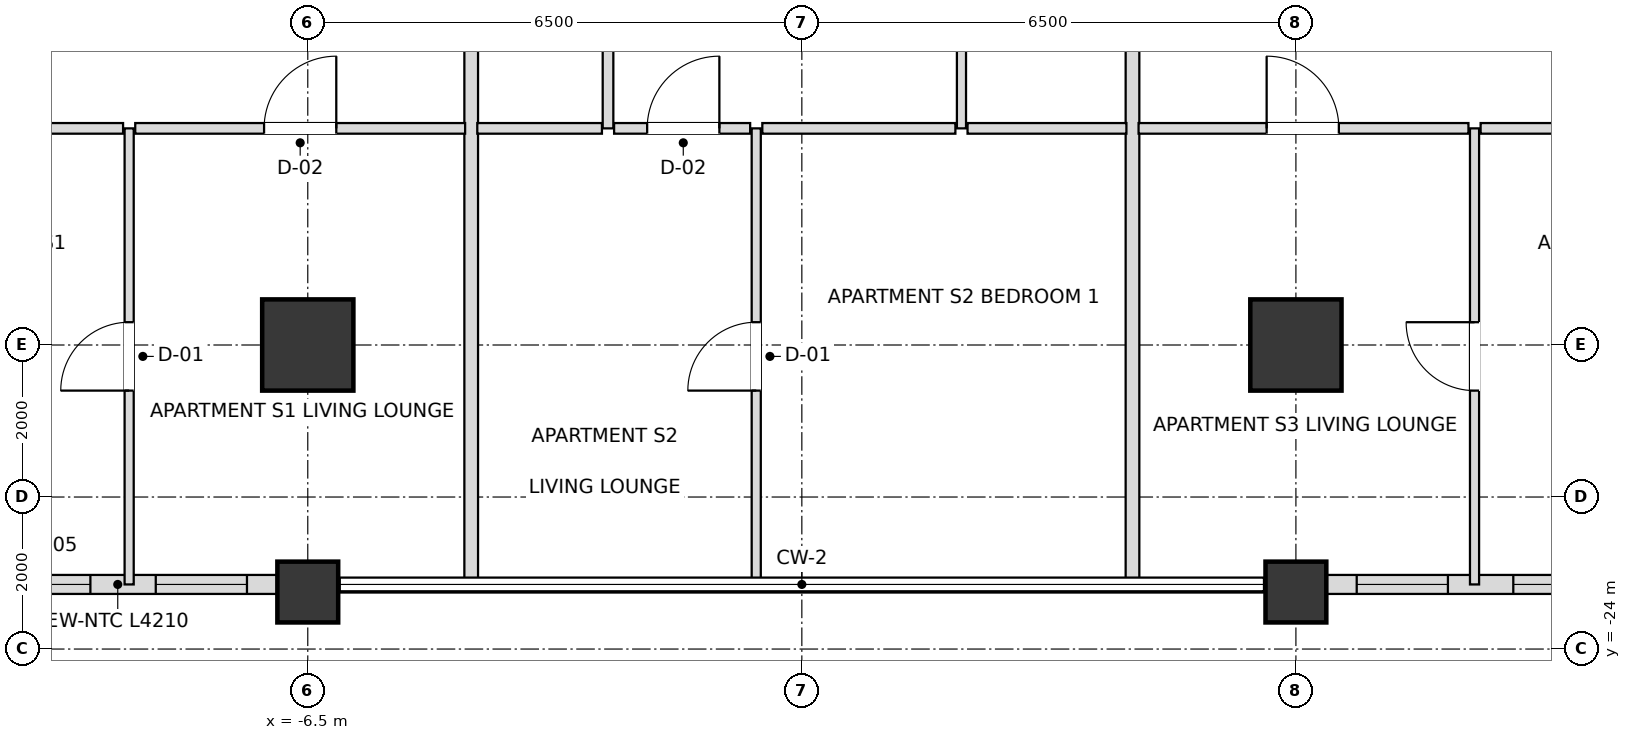
"""IFC4 building model, lengths in metres.
Left out: names, types, materials, properties, quantities, classifications, styles, units other than length and angle.
Written with IfcOpenShell. Run it as: python <this file> out.ifc"""

import sys

from ifc_helpers import new_model, si_unit, direction, frame, frame_2d, origin, origin_2d, place, context, subcontext, project, spatial, rectangle, extrude, element, fill, save


model = new_model("IFC4")
c1 = context("Model", 3, precision=1e-05, world=origin(), true_north=direction((0.0, 1.0)))
c2 = subcontext(c1, "Body", "Model", "MODEL_VIEW")
j1 = project(units=[si_unit("LENGTHUNIT", "METRE"), si_unit("PLANEANGLEUNIT", "RADIAN")], contexts=[c1])
p1 = place(None, origin())
s1 = spatial("IfcSite", under=j1, at=p1, CompositionType="ELEMENT")
p2 = place(p1, origin())
s2 = spatial("IfcBuilding", under=s1, at=p2, CompositionType="ELEMENT")
p3 = place(p2, frame((0.0, 0.0, 117.0)))
s3 = spatial("IfcBuildingStorey", under=s2, at=p3, CompositionType="ELEMENT", Elevation=117.0)
for number, where, z_axis, x_axis in (
    (1, (-6.5, -20.0, 0.0), (0.0, 0.0, 1.0), (1.0, 0.0, 0.0)),
    (2, (6.5, -20.0, 0.0), (0.0, 0.0, 1.0), (1.0, 0.0, 0.0)),
):
    element("IfcColumn", number, at=place(p3, frame(where, z_axis=z_axis, x_axis=x_axis)), inside=s3, PredefinedType="USERDEFINED", context=c2, shape_type="SweptSolid", body=[
        extrude(rectangle(XDim=1.2, YDim=1.2, at=origin_2d()), origin(), (0.0, 0.0, 1.0), 3.6),
    ])
for number, where, z_axis, x_axis in (
    (3, (-6.5, -23.25, 0.0), (0.0, 0.0, 1.0), (1.0, 0.0, 0.0)),
    (4, (6.5, -23.25, 0.0), (0.0, 0.0, 1.0), (1.0, 0.0, 0.0)),
):
    element("IfcColumn", number, at=place(p3, frame(where, z_axis=z_axis, x_axis=x_axis)), inside=s3, PredefinedType="COLUMN", context=c2, shape_type="SweptSolid", body=[
        extrude(rectangle(XDim=0.8, YDim=0.8, at=origin_2d()), origin(), (0.0, 0.0, 1.0), 3.6),
    ])
p4 = place(p3, frame((-11.105, -23.15, 0.0), z_axis=(0.0, 0.0, 1.0), x_axis=(1.0, 0.0, 0.0)))
e5 = element("IfcWall", 5, at=p4, inside=s3, PredefinedType="SOLIDWALL", context=c2, shape_type="SweptSolid", body=[
    extrude(rectangle(XDim=4.21, YDim=0.25, at=frame_2d((2.105, 0.0))), origin(), (0.0, 0.0, 1.0), 2.656),
])
p5 = place(p4, frame((0.545, 0.0, 0.72)))
e6 = element("IfcOpeningElement", 6, at=p5, cuts=e5, PredefinedType="OPENING", context=c2, shape_type="SweptSolid", body=[
    extrude(rectangle(XDim=1.2, YDim=1.68, at=frame_2d((0.6, 0.84))), frame((0.0, 0.135, 0.0), z_axis=(0.0, -1.0, 0.0), x_axis=(1.0, 0.0, 0.0)), (0.0, 0.0, 1.0), 0.27),
])
p6 = place(p4, frame((2.605, 0.0, 0.72)))
e7 = element("IfcOpeningElement", 7, at=p6, cuts=e5, PredefinedType="OPENING", context=c2, shape_type="SweptSolid", body=[
    extrude(rectangle(XDim=1.2, YDim=1.68, at=frame_2d((0.6, 0.84))), frame((0.0, 0.135, 0.0), z_axis=(0.0, -1.0, 0.0), x_axis=(1.0, 0.0, 0.0)), (0.0, 0.0, 1.0), 0.27),
])
p7 = place(p3, frame((6.895, -23.15, 0.0), z_axis=(0.0, 0.0, 1.0), x_axis=(1.0, 0.0, 0.0)))
e8 = element("IfcWall", 8, at=p7, inside=s3, PredefinedType="SOLIDWALL", context=c2, shape_type="SweptSolid", body=[
    extrude(rectangle(XDim=4.21, YDim=0.25, at=frame_2d((2.105, 0.0))), origin(), (0.0, 0.0, 1.0), 2.656),
])
p8 = place(p7, frame((0.405, 0.0, 0.72)))
e9 = element("IfcOpeningElement", 9, at=p8, cuts=e8, PredefinedType="OPENING", context=c2, shape_type="SweptSolid", body=[
    extrude(rectangle(XDim=1.2, YDim=1.68, at=frame_2d((0.6, 0.84))), frame((0.0, 0.135, 0.0), z_axis=(0.0, -1.0, 0.0), x_axis=(1.0, 0.0, 0.0)), (0.0, 0.0, 1.0), 0.27),
])
p9 = place(p7, frame((2.465, 0.0, 0.72)))
e10 = element("IfcOpeningElement", 10, at=p9, cuts=e8, PredefinedType="OPENING", context=c2, shape_type="SweptSolid", body=[
    extrude(rectangle(XDim=1.2, YDim=1.68, at=frame_2d((0.6, 0.84))), frame((0.0, 0.135, 0.0), z_axis=(0.0, -1.0, 0.0), x_axis=(1.0, 0.0, 0.0)), (0.0, 0.0, 1.0), 0.27),
])
p10 = place(p3, frame((-8.85, -23.15, 0.0), z_axis=(0.0, 0.0, 1.0), x_axis=(0.0, 1.0, 0.0)))
e11 = element("IfcWall", 11, at=p10, inside=s3, PredefinedType="PARTITIONING", context=c2, shape_type="SweptSolid", body=[
    extrude(rectangle(XDim=6.0, YDim=0.12, at=frame_2d((3.0, 0.0))), origin(), (0.0, 0.0, 1.0), 2.736),
])
p11 = place(p10, frame((2.55, 0.0, 0.0)))
e12 = element("IfcOpeningElement", 12, at=p11, cuts=e11, PredefinedType="OPENING", context=c2, shape_type="SweptSolid", body=[
    extrude(rectangle(XDim=0.9, YDim=2.1, at=frame_2d((0.45, 1.05))), frame((0.0, 0.07, 0.0), z_axis=(0.0, -1.0, 0.0), x_axis=(1.0, 0.0, 0.0)), (0.0, 0.0, 1.0), 0.14),
])
p12 = place(p3, frame((-4.35, -23.15, 0.0), z_axis=(0.0, 0.0, 1.0), x_axis=(0.0, 1.0, 0.0)))
e13 = element("IfcWall", 13, at=p12, inside=s3, PredefinedType="PARTITIONING", context=c2, shape_type="SweptSolid", body=[
    extrude(rectangle(XDim=13.85, YDim=0.18, at=frame_2d((6.925, 0.0))), origin(), (0.0, 0.0, 1.0), 2.736),
])
p13 = place(p3, frame((-2.55, -17.15, 0.0), z_axis=(0.0, 0.0, 1.0), x_axis=(0.0, 1.0, 0.0)))
e14 = element("IfcWall", 14, at=p13, inside=s3, PredefinedType="PARTITIONING", context=c2, shape_type="SweptSolid", body=[
    extrude(rectangle(XDim=7.85, YDim=0.14, at=frame_2d((3.925, 0.0))), origin(), (0.0, 0.0, 1.0), 3.3),
])
p14 = place(p13, frame((3.48, 0.0, 0.0)))
e15 = element("IfcOpeningElement", 15, at=p14, cuts=e14, PredefinedType="OPENING", context=c2, shape_type="SweptSolid", body=[
    extrude(rectangle(XDim=0.9, YDim=2.1, at=frame_2d((0.45, 1.05))), frame((0.0, 0.08, 0.0), z_axis=(0.0, -1.0, 0.0), x_axis=(1.0, 0.0, 0.0)), (0.0, 0.0, 1.0), 0.16),
])
p15 = place(p3, frame((-0.6, -23.15, 0.0), z_axis=(0.0, 0.0, 1.0), x_axis=(0.0, 1.0, 0.0)))
e16 = element("IfcWall", 16, at=p15, inside=s3, PredefinedType="PARTITIONING", context=c2, shape_type="SweptSolid", body=[
    extrude(rectangle(XDim=6.0, YDim=0.12, at=frame_2d((3.0, 0.0))), origin(), (0.0, 0.0, 1.0), 2.736),
])
p16 = place(p15, frame((2.55, 0.0, 0.0)))
e17 = element("IfcOpeningElement", 17, at=p16, cuts=e16, PredefinedType="OPENING", context=c2, shape_type="SweptSolid", body=[
    extrude(rectangle(XDim=0.9, YDim=2.1, at=frame_2d((0.45, 1.05))), frame((0.0, 0.07, 0.0), z_axis=(0.0, -1.0, 0.0), x_axis=(1.0, 0.0, 0.0)), (0.0, 0.0, 1.0), 0.14),
])
p17 = place(p3, frame((2.1, -17.15, 0.0), z_axis=(0.0, 0.0, 1.0), x_axis=(0.0, 1.0, 0.0)))
e18 = element("IfcWall", 18, at=p17, inside=s3, PredefinedType="PARTITIONING", context=c2, shape_type="SweptSolid", body=[
    extrude(rectangle(XDim=7.85, YDim=0.12, at=frame_2d((3.925, 0.0))), origin(), (0.0, 0.0, 1.0), 3.3),
])
p18 = place(p17, frame((3.455, 0.0, 0.0)))
e19 = element("IfcOpeningElement", 19, at=p18, cuts=e18, PredefinedType="OPENING", context=c2, shape_type="SweptSolid", body=[
    extrude(rectangle(XDim=0.95, YDim=2.1, at=frame_2d((0.475, 1.05))), frame((0.0, 0.07, 0.0), z_axis=(0.0, -1.0, 0.0), x_axis=(1.0, 0.0, 0.0)), (0.0, 0.0, 1.0), 0.14),
])
p19 = place(p3, frame((4.35, -23.15, 0.0), z_axis=(0.0, 0.0, 1.0), x_axis=(0.0, 1.0, 0.0)))
e20 = element("IfcWall", 20, at=p19, inside=s3, PredefinedType="PARTITIONING", context=c2, shape_type="SweptSolid", body=[
    extrude(rectangle(XDim=13.85, YDim=0.18, at=frame_2d((6.925, 0.0))), origin(), (0.0, 0.0, 1.0), 2.736),
])
p20 = place(p3, frame((8.85, -23.15, 0.0), z_axis=(0.0, 0.0, 1.0), x_axis=(0.0, 1.0, 0.0)))
e21 = element("IfcWall", 21, at=p20, inside=s3, PredefinedType="PARTITIONING", context=c2, shape_type="SweptSolid", body=[
    extrude(rectangle(XDim=6.0, YDim=0.12, at=frame_2d((3.0, 0.0))), origin(), (0.0, 0.0, 1.0), 2.736),
])
p21 = place(p20, frame((2.55, 0.0, 0.0)))
e22 = element("IfcOpeningElement", 22, at=p21, cuts=e21, PredefinedType="OPENING", context=c2, shape_type="SweptSolid", body=[
    extrude(rectangle(XDim=0.9, YDim=2.1, at=frame_2d((0.45, 1.05))), frame((0.0, 0.07, 0.0), z_axis=(0.0, -1.0, 0.0), x_axis=(1.0, 0.0, 0.0)), (0.0, 0.0, 1.0), 0.14),
])
p22 = place(p3, frame((-10.67, -17.15, 0.0), z_axis=(0.0, 0.0, 1.0), x_axis=(1.0, 0.0, 0.0)))
e23 = element("IfcWall", 23, at=p22, inside=s3, PredefinedType="PARTITIONING", context=c2, shape_type="SweptSolid", body=[
    extrude(rectangle(XDim=1.74, YDim=0.14, at=frame_2d((0.87, 0.0))), origin(), (0.0, 0.0, 1.0), 3.3),
])
p23 = place(p3, frame((-8.77, -17.15, 0.0), z_axis=(0.0, 0.0, 1.0), x_axis=(1.0, 0.0, 0.0)))
e24 = element("IfcWall", 24, at=p23, inside=s3, PredefinedType="PARTITIONING", context=c2, shape_type="SweptSolid", body=[
    extrude(rectangle(XDim=4.34, YDim=0.14, at=frame_2d((2.17, 0.0))), origin(), (0.0, 0.0, 1.0), 2.736),
])
p24 = place(p23, frame((1.695, 0.0, 0.0)))
e25 = element("IfcOpeningElement", 25, at=p24, cuts=e24, PredefinedType="OPENING", context=c2, shape_type="SweptSolid", body=[
    extrude(rectangle(XDim=0.95, YDim=2.1, at=frame_2d((0.475, 1.05))), frame((0.0, 0.08, 0.0), z_axis=(0.0, -1.0, 0.0), x_axis=(1.0, 0.0, 0.0)), (0.0, 0.0, 1.0), 0.16),
])
p25 = place(p3, frame((-4.27, -17.15, 0.0), z_axis=(0.0, 0.0, 1.0), x_axis=(1.0, 0.0, 0.0)))
e26 = element("IfcWall", 26, at=p25, inside=s3, PredefinedType="PARTITIONING", context=c2, shape_type="SweptSolid", body=[
    extrude(rectangle(XDim=1.64, YDim=0.14, at=frame_2d((0.82, 0.0))), origin(), (0.0, 0.0, 1.0), 3.3),
])
p26 = place(p3, frame((-2.47, -17.15, 0.0), z_axis=(0.0, 0.0, 1.0), x_axis=(1.0, 0.0, 0.0)))
e27 = element("IfcWall", 27, at=p26, inside=s3, PredefinedType="PARTITIONING", context=c2, shape_type="SweptSolid", body=[
    extrude(rectangle(XDim=1.79, YDim=0.14, at=frame_2d((0.895, 0.0))), origin(), (0.0, 0.0, 1.0), 3.3),
])
p27 = place(p26, frame((0.435, 0.0, 0.0)))
e28 = element("IfcOpeningElement", 28, at=p27, cuts=e27, PredefinedType="OPENING", context=c2, shape_type="SweptSolid", body=[
    extrude(rectangle(XDim=0.95, YDim=2.1, at=frame_2d((0.475, 1.05))), frame((0.0, 0.08, 0.0), z_axis=(0.0, -1.0, 0.0), x_axis=(1.0, 0.0, 0.0)), (0.0, 0.0, 1.0), 0.16),
])
p28 = place(p3, frame((-0.52, -17.15, 0.0), z_axis=(0.0, 0.0, 1.0), x_axis=(1.0, 0.0, 0.0)))
e29 = element("IfcWall", 29, at=p28, inside=s3, PredefinedType="PARTITIONING", context=c2, shape_type="SweptSolid", body=[
    extrude(rectangle(XDim=2.54, YDim=0.14, at=frame_2d((1.27, 0.0))), origin(), (0.0, 0.0, 1.0), 3.3),
])
p29 = place(p3, frame((2.18, -17.15, 0.0), z_axis=(0.0, 0.0, 1.0), x_axis=(1.0, 0.0, 0.0)))
e30 = element("IfcWall", 30, at=p29, inside=s3, PredefinedType="PARTITIONING", context=c2, shape_type="SweptSolid", body=[
    extrude(rectangle(XDim=2.09, YDim=0.14, at=frame_2d((1.045, 0.0))), origin(), (0.0, 0.0, 1.0), 3.3),
])
p30 = place(p3, frame((4.43, -17.15, 0.0), z_axis=(0.0, 0.0, 1.0), x_axis=(1.0, 0.0, 0.0)))
e31 = element("IfcWall", 31, at=p30, inside=s3, PredefinedType="PARTITIONING", context=c2, shape_type="SweptSolid", body=[
    extrude(rectangle(XDim=4.34, YDim=0.14, at=frame_2d((2.17, 0.0))), origin(), (0.0, 0.0, 1.0), 2.736),
])
p31 = place(p30, frame((1.685, 0.0, 0.0)))
e32 = element("IfcOpeningElement", 32, at=p31, cuts=e31, PredefinedType="OPENING", context=c2, shape_type="SweptSolid", body=[
    extrude(rectangle(XDim=0.95, YDim=2.1, at=frame_2d((0.475, 1.05))), frame((0.0, 0.08, 0.0), z_axis=(0.0, -1.0, 0.0), x_axis=(1.0, 0.0, 0.0)), (0.0, 0.0, 1.0), 0.16),
])
p32 = place(p3, frame((8.93, -17.15, 0.0), z_axis=(0.0, 0.0, 1.0), x_axis=(1.0, 0.0, 0.0)))
e33 = element("IfcWall", 33, at=p32, inside=s3, PredefinedType="PARTITIONING", context=c2, shape_type="SweptSolid", body=[
    extrude(rectangle(XDim=1.74, YDim=0.14, at=frame_2d((0.87, 0.0))), origin(), (0.0, 0.0, 1.0), 3.3),
])
p33 = place(p5, origin())
e34 = element("IfcWindow", 34, at=p33, inside=s3, PartitioningType="SINGLE_PANEL", PredefinedType="WINDOW", context=c2, shape_type="SweptSolid", body=[
    extrude(rectangle(XDim=1.2, YDim=1.68, at=frame_2d((0.6, 0.84))), frame((0.0, 0.03, 0.0), z_axis=(0.0, -1.0, 0.0), x_axis=(1.0, 0.0, 0.0)), (0.0, 0.0, 1.0), 0.06),
])
fill(e6, e34)
p34 = place(p6, origin())
e35 = element("IfcWindow", 35, at=p34, inside=s3, PartitioningType="SINGLE_PANEL", PredefinedType="WINDOW", context=c2, shape_type="SweptSolid", body=[
    extrude(rectangle(XDim=1.2, YDim=1.68, at=frame_2d((0.6, 0.84))), frame((0.0, 0.03, 0.0), z_axis=(0.0, -1.0, 0.0), x_axis=(1.0, 0.0, 0.0)), (0.0, 0.0, 1.0), 0.06),
])
fill(e7, e35)
p35 = place(p8, origin())
e36 = element("IfcWindow", 36, at=p35, inside=s3, PartitioningType="SINGLE_PANEL", PredefinedType="WINDOW", context=c2, shape_type="SweptSolid", body=[
    extrude(rectangle(XDim=1.2, YDim=1.68, at=frame_2d((0.6, 0.84))), frame((0.0, 0.03, 0.0), z_axis=(0.0, -1.0, 0.0), x_axis=(1.0, 0.0, 0.0)), (0.0, 0.0, 1.0), 0.06),
])
fill(e9, e36)
p36 = place(p9, origin())
e37 = element("IfcWindow", 37, at=p36, inside=s3, PartitioningType="SINGLE_PANEL", PredefinedType="WINDOW", context=c2, shape_type="SweptSolid", body=[
    extrude(rectangle(XDim=1.2, YDim=1.68, at=frame_2d((0.6, 0.84))), frame((0.0, 0.03, 0.0), z_axis=(0.0, -1.0, 0.0), x_axis=(1.0, 0.0, 0.0)), (0.0, 0.0, 1.0), 0.06),
])
fill(e10, e37)
p37 = place(p24, origin())
e38 = element("IfcDoor", 38, at=p37, inside=s3, OperationType="SINGLE_SWING_RIGHT", PredefinedType="DOOR", context=c2, shape_type="SweptSolid", body=[
    extrude(rectangle(XDim=0.95, YDim=2.1, at=frame_2d((0.475, 1.05))), frame((0.0, 0.025, 0.0), z_axis=(0.0, -1.0, 0.0), x_axis=(1.0, 0.0, 0.0)), (0.0, 0.0, 1.0), 0.05),
])
fill(e25, e38)
p38 = place(p11, origin())
e39 = element("IfcDoor", 39, at=p38, inside=s3, OperationType="SINGLE_SWING_LEFT", PredefinedType="DOOR", context=c2, shape_type="SweptSolid", body=[
    extrude(rectangle(XDim=0.9, YDim=2.1, at=frame_2d((0.45, 1.05))), frame((0.0, 0.025, 0.0), z_axis=(0.0, -1.0, 0.0), x_axis=(1.0, 0.0, 0.0)), (0.0, 0.0, 1.0), 0.05),
])
fill(e12, e39)
p39 = place(p27, origin())
e40 = element("IfcDoor", 40, at=p39, inside=s3, OperationType="SINGLE_SWING_RIGHT", PredefinedType="DOOR", context=c2, shape_type="SweptSolid", body=[
    extrude(rectangle(XDim=0.95, YDim=2.1, at=frame_2d((0.475, 1.05))), frame((0.0, 0.025, 0.0), z_axis=(0.0, -1.0, 0.0), x_axis=(1.0, 0.0, 0.0)), (0.0, 0.0, 1.0), 0.05),
])
fill(e28, e40)
p40 = place(p16, origin())
e41 = element("IfcDoor", 41, at=p40, inside=s3, OperationType="SINGLE_SWING_LEFT", PredefinedType="DOOR", context=c2, shape_type="SweptSolid", body=[
    extrude(rectangle(XDim=0.9, YDim=2.1, at=frame_2d((0.45, 1.05))), frame((0.0, 0.025, 0.0), z_axis=(0.0, -1.0, 0.0), x_axis=(1.0, 0.0, 0.0)), (0.0, 0.0, 1.0), 0.05),
])
fill(e17, e41)
p41 = place(p31, origin())
e42 = element("IfcDoor", 42, at=p41, inside=s3, OperationType="SINGLE_SWING_LEFT", PredefinedType="DOOR", context=c2, shape_type="SweptSolid", body=[
    extrude(rectangle(XDim=0.95, YDim=2.1, at=frame_2d((0.475, 1.05))), frame((0.0, 0.025, 0.0), z_axis=(0.0, -1.0, 0.0), x_axis=(1.0, 0.0, 0.0)), (0.0, 0.0, 1.0), 0.05),
])
fill(e32, e42)
p42 = place(p21, origin())
e43 = element("IfcDoor", 43, at=p42, inside=s3, OperationType="SINGLE_SWING_RIGHT", PredefinedType="DOOR", context=c2, shape_type="SweptSolid", body=[
    extrude(rectangle(XDim=0.9, YDim=2.1, at=frame_2d((0.45, 1.05))), frame((0.0, 0.025, 0.0), z_axis=(0.0, -1.0, 0.0), x_axis=(1.0, 0.0, 0.0)), (0.0, 0.0, 1.0), 0.05),
])
fill(e22, e43)
save(model, sys.argv[1])
